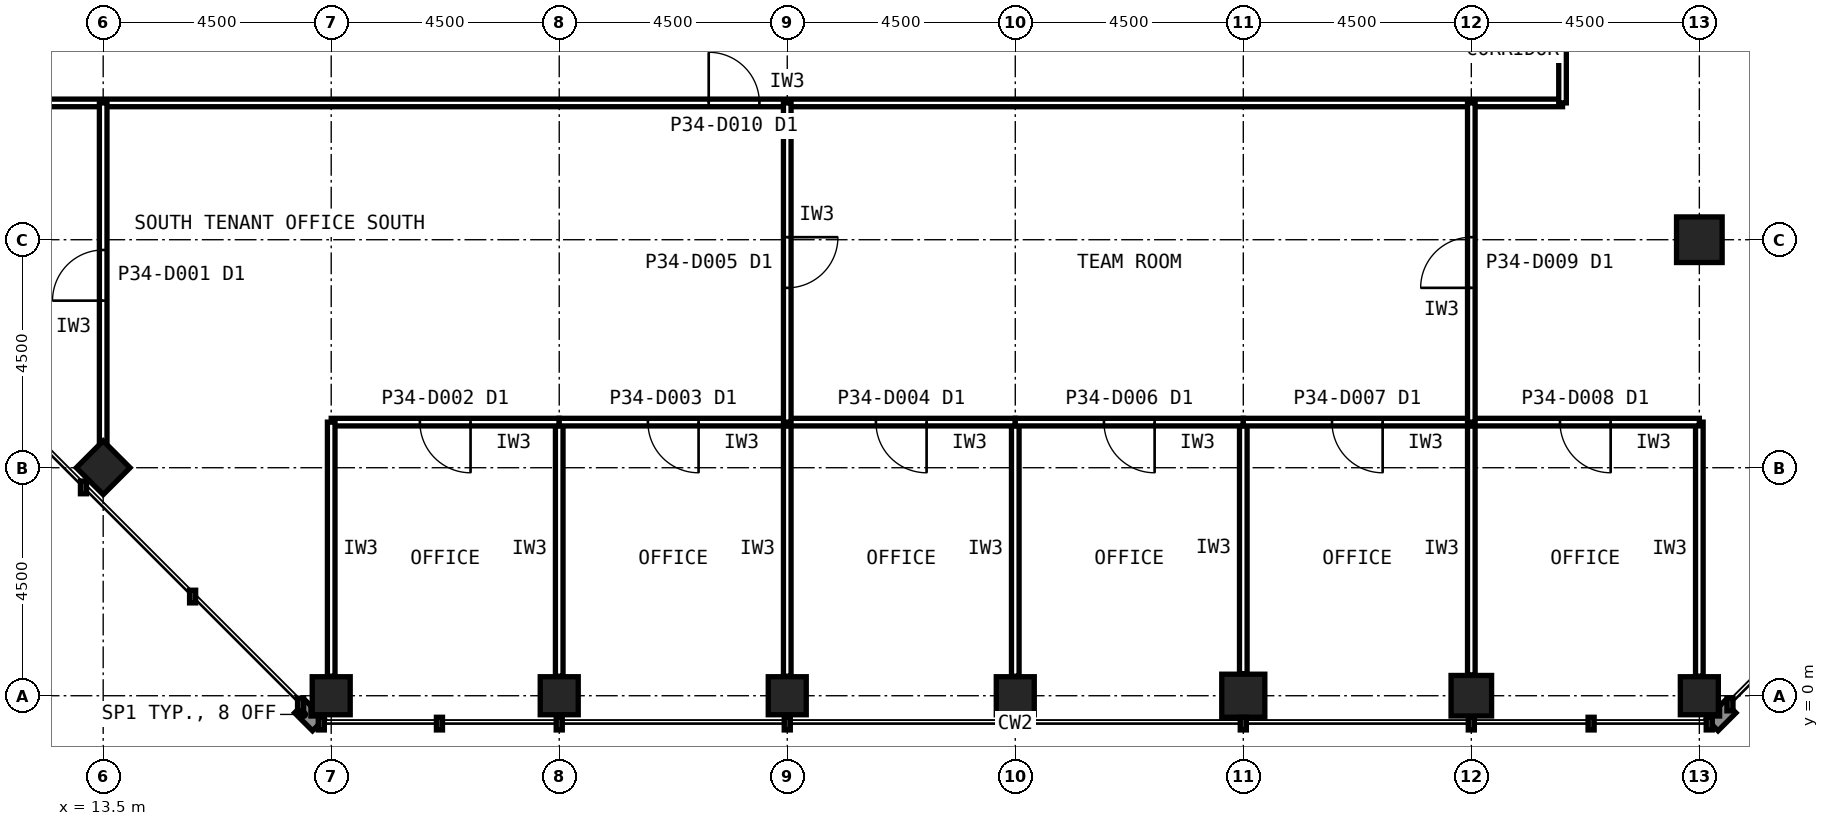
"""IFC4 building model, lengths in metres.
Left out: names, types, materials, properties, quantities, classifications, styles, units other than length and angle.
Written with IfcOpenShell. Run it as: python <this file> out.ifc"""

import sys

from ifc_helpers import new_model, si_unit, direction, frame, frame_2d, origin, origin_2d, place, context, subcontext, project, spatial, rectangle, hollow_rectangle, extrude, element, fill, save


model = new_model("IFC4")
c1 = context("Model", 3, precision=1e-05, world=origin(), true_north=direction((0.0, 1.0)))
c2 = subcontext(c1, "Body", "Model", "MODEL_VIEW")
j1 = project(units=[si_unit("LENGTHUNIT", "METRE"), si_unit("PLANEANGLEUNIT", "RADIAN")], contexts=[c1])
p1 = place(None, origin())
s1 = spatial("IfcSite", under=j1, at=p1, CompositionType="ELEMENT")
p2 = place(p1, origin())
s2 = spatial("IfcBuilding", under=s1, at=p2, CompositionType="ELEMENT")
p3 = place(p2, frame((0.0, 0.0, 143.6)))
s3 = spatial("IfcBuildingStorey", under=s2, at=p3, CompositionType="ELEMENT", Elevation=143.6)
for number, where, z_axis, x_axis in (
    (1, (18.0, 0.0, 0.0), (0.0, 0.0, 1.0), (1.0, 0.0, 0.0)),
    (2, (22.5, 0.0, 0.0), (0.0, 0.0, 1.0), (1.0, 0.0, 0.0)),
    (3, (27.0, 0.0, 0.0), (0.0, 0.0, 1.0), (1.0, 0.0, 0.0)),
    (4, (31.5, 0.0, 0.0), (0.0, 0.0, 1.0), (1.0, 0.0, 0.0)),
):
    element("IfcColumn", number, at=place(p3, frame(where, z_axis=z_axis, x_axis=x_axis)), inside=s3, PredefinedType="COLUMN", context=c2, shape_type="SweptSolid", body=[
        extrude(hollow_rectangle(XDim=0.75, YDim=0.75, WallThickness=0.04, at=origin_2d()), origin(), (0.0, 0.0, 1.0), 4.0),
    ])
p4 = place(p3, frame((36.0, 0.0, 0.0), z_axis=(0.0, 0.0, 1.0), x_axis=(1.0, 0.0, 0.0)))
e5 = element("IfcColumn", 5, at=p4, inside=s3, PredefinedType="COLUMN", context=c2, shape_type="SweptSolid", body=[
    extrude(hollow_rectangle(XDim=0.85, YDim=0.85, WallThickness=0.05, at=origin_2d()), origin(), (0.0, 0.0, 1.0), 4.0),
])
p5 = place(p3, frame((40.5, 0.0, 0.0), z_axis=(0.0, 0.0, 1.0), x_axis=(1.0, 0.0, 0.0)))
e6 = element("IfcColumn", 6, at=p5, inside=s3, PredefinedType="COLUMN", context=c2, shape_type="SweptSolid", body=[
    extrude(hollow_rectangle(XDim=0.8, YDim=0.8, WallThickness=0.045, at=origin_2d()), origin(), (0.0, 0.0, 1.0), 4.0),
])
for number, where, z_axis, x_axis in (
    (7, (45.0, 0.0, 0.0), (0.0, 0.0, 1.0), (1.0, 0.0, 0.0)),
    (8, (13.5, 4.5, 0.0), (0.0, 0.0, 1.0), (0.707, 0.707, 0.0)),
):
    element("IfcColumn", number, at=place(p3, frame(where, z_axis=z_axis, x_axis=x_axis)), inside=s3, PredefinedType="COLUMN", context=c2, shape_type="SweptSolid", body=[
        extrude(hollow_rectangle(XDim=0.75, YDim=0.75, WallThickness=0.04, at=origin_2d()), origin(), (0.0, 0.0, 1.0), 4.0),
    ])
p6 = place(p3, frame((45.0, 9.0, 0.0), z_axis=(0.0, 0.0, 1.0), x_axis=(1.0, 0.0, 0.0)))
e9 = element("IfcColumn", 9, at=p6, inside=s3, PredefinedType="COLUMN", context=c2, shape_type="SweptSolid", body=[
    extrude(hollow_rectangle(XDim=0.9, YDim=0.9, WallThickness=0.063, at=origin_2d()), origin(), (0.0, 0.0, 1.0), 4.0),
])
p7 = place(p3, frame((11.7, 11.7, 0.0), z_axis=(0.0, 0.0, 1.0), x_axis=(1.0, 0.0, 0.0)))
e10 = element("IfcWall", 10, at=p7, inside=s3, PredefinedType="PARTITIONING", context=c2, shape_type="SweptSolid", body=[
    extrude(rectangle(XDim=30.6, YDim=0.15, at=frame_2d((15.3, 0.0))), origin(), (0.0, 0.0, 1.0), 3.84),
])
p8 = place(p7, frame((13.75, 0.0, 0.0)))
e11 = element("IfcOpeningElement", 11, at=p8, cuts=e10, PredefinedType="OPENING", context=c2, shape_type="SweptSolid", body=[
    extrude(rectangle(XDim=1.0, YDim=2.1, at=frame_2d((0.5, 1.05))), frame((0.0, 0.085, 0.0), z_axis=(0.0, -1.0, 0.0), x_axis=(1.0, 0.0, 0.0)), (0.0, 0.0, 1.0), 0.17),
])
p9 = place(p3, frame((42.3, 11.7, 0.0), z_axis=(0.0, 0.0, 1.0), x_axis=(0.0, 1.0, 0.0)))
e12 = element("IfcWall", 12, at=p9, inside=s3, PredefinedType="PARTITIONING", context=c2, shape_type="SweptSolid", body=[
    extrude(rectangle(XDim=15.3, YDim=0.15, at=frame_2d((7.65, 0.0))), origin(), (0.0, 0.0, 1.0), 3.84),
])
p10 = place(p9, frame((7.15, 0.0, 0.0)))
e13 = element("IfcOpeningElement", 13, at=p10, cuts=e12, PredefinedType="OPENING", context=c2, shape_type="SweptSolid", body=[
    extrude(rectangle(XDim=1.0, YDim=2.1, at=frame_2d((0.5, 1.05))), frame((0.0, 0.085, 0.0), z_axis=(0.0, -1.0, 0.0), x_axis=(1.0, 0.0, 0.0)), (0.0, 0.0, 1.0), 0.17),
])
p11 = place(p3, frame((22.5, 0.385, 0.0), z_axis=(0.0, 0.0, 1.0), x_axis=(0.0, 1.0, 0.0)))
e14 = element("IfcWall", 14, at=p11, inside=s3, PredefinedType="PARTITIONING", context=c2, shape_type="SweptSolid", body=[
    extrude(rectangle(XDim=5.015, YDim=0.15, at=frame_2d((2.507, 0.0))), origin(), (0.0, 0.0, 1.0), 2.989),
])
p12 = place(p3, frame((22.5, 5.4, 0.0), z_axis=(0.0, 0.0, 1.0), x_axis=(-1.0, 0.0, 0.0)))
e15 = element("IfcWall", 15, at=p12, inside=s3, PredefinedType="PARTITIONING", context=c2, shape_type="SweptSolid", body=[
    extrude(rectangle(XDim=4.5, YDim=0.15, at=frame_2d((2.25, 0.0))), origin(), (0.0, 0.0, 1.0), 3.84),
])
p13 = place(p12, frame((1.75, 0.0, 0.0)))
e16 = element("IfcOpeningElement", 16, at=p13, cuts=e15, PredefinedType="OPENING", context=c2, shape_type="SweptSolid", body=[
    extrude(rectangle(XDim=1.0, YDim=2.1, at=frame_2d((0.5, 1.05))), frame((0.0, 0.085, 0.0), z_axis=(0.0, -1.0, 0.0), x_axis=(1.0, 0.0, 0.0)), (0.0, 0.0, 1.0), 0.17),
])
for number, where, z_axis, x_axis in (
    (17, (18.0, 5.4, 0.0), (0.0, 0.0, 1.0), (0.0, -1.0, 0.0)),
    (18, (27.0, 0.385, 0.0), (0.0, 0.0, 1.0), (0.0, 1.0, 0.0)),
):
    element("IfcWall", number, at=place(p3, frame(where, z_axis=z_axis, x_axis=x_axis)), inside=s3, PredefinedType="PARTITIONING", context=c2, shape_type="SweptSolid", body=[
        extrude(rectangle(XDim=5.015, YDim=0.15, at=frame_2d((2.507, 0.0))), origin(), (0.0, 0.0, 1.0), 2.989),
    ])
p14 = place(p3, frame((27.0, 5.4, 0.0), z_axis=(0.0, 0.0, 1.0), x_axis=(-1.0, 0.0, 0.0)))
e19 = element("IfcWall", 19, at=p14, inside=s3, PredefinedType="PARTITIONING", context=c2, shape_type="SweptSolid", body=[
    extrude(rectangle(XDim=4.5, YDim=0.15, at=frame_2d((2.25, 0.0))), origin(), (0.0, 0.0, 1.0), 3.84),
])
p15 = place(p14, frame((1.75, 0.0, 0.0)))
e20 = element("IfcOpeningElement", 20, at=p15, cuts=e19, PredefinedType="OPENING", context=c2, shape_type="SweptSolid", body=[
    extrude(rectangle(XDim=1.0, YDim=2.1, at=frame_2d((0.5, 1.05))), frame((0.0, 0.085, 0.0), z_axis=(0.0, -1.0, 0.0), x_axis=(1.0, 0.0, 0.0)), (0.0, 0.0, 1.0), 0.17),
])
p16 = place(p3, frame((31.5, 0.385, 0.0), z_axis=(0.0, 0.0, 1.0), x_axis=(0.0, 1.0, 0.0)))
e21 = element("IfcWall", 21, at=p16, inside=s3, PredefinedType="PARTITIONING", context=c2, shape_type="SweptSolid", body=[
    extrude(rectangle(XDim=5.015, YDim=0.15, at=frame_2d((2.507, 0.0))), origin(), (0.0, 0.0, 1.0), 2.989),
])
p17 = place(p3, frame((31.5, 5.4, 0.0), z_axis=(0.0, 0.0, 1.0), x_axis=(-1.0, 0.0, 0.0)))
e22 = element("IfcWall", 22, at=p17, inside=s3, PredefinedType="PARTITIONING", context=c2, shape_type="SweptSolid", body=[
    extrude(rectangle(XDim=4.5, YDim=0.15, at=frame_2d((2.25, 0.0))), origin(), (0.0, 0.0, 1.0), 3.84),
])
p18 = place(p17, frame((1.75, 0.0, 0.0)))
e23 = element("IfcOpeningElement", 23, at=p18, cuts=e22, PredefinedType="OPENING", context=c2, shape_type="SweptSolid", body=[
    extrude(rectangle(XDim=1.0, YDim=2.1, at=frame_2d((0.5, 1.05))), frame((0.0, 0.085, 0.0), z_axis=(0.0, -1.0, 0.0), x_axis=(1.0, 0.0, 0.0)), (0.0, 0.0, 1.0), 0.17),
])
p19 = place(p3, frame((36.0, 0.435, 0.0), z_axis=(0.0, 0.0, 1.0), x_axis=(0.0, 1.0, 0.0)))
e24 = element("IfcWall", 24, at=p19, inside=s3, PredefinedType="PARTITIONING", context=c2, shape_type="SweptSolid", body=[
    extrude(rectangle(XDim=4.965, YDim=0.15, at=frame_2d((2.482, 0.0))), origin(), (0.0, 0.0, 1.0), 2.989),
])
p20 = place(p3, frame((36.0, 5.4, 0.0), z_axis=(0.0, 0.0, 1.0), x_axis=(-1.0, 0.0, 0.0)))
e25 = element("IfcWall", 25, at=p20, inside=s3, PredefinedType="PARTITIONING", context=c2, shape_type="SweptSolid", body=[
    extrude(rectangle(XDim=4.5, YDim=0.15, at=frame_2d((2.25, 0.0))), origin(), (0.0, 0.0, 1.0), 3.84),
])
p21 = place(p20, frame((1.75, 0.0, 0.0)))
e26 = element("IfcOpeningElement", 26, at=p21, cuts=e25, PredefinedType="OPENING", context=c2, shape_type="SweptSolid", body=[
    extrude(rectangle(XDim=1.0, YDim=2.1, at=frame_2d((0.5, 1.05))), frame((0.0, 0.085, 0.0), z_axis=(0.0, -1.0, 0.0), x_axis=(1.0, 0.0, 0.0)), (0.0, 0.0, 1.0), 0.17),
])
p22 = place(p3, frame((40.5, 0.41, 0.0), z_axis=(0.0, 0.0, 1.0), x_axis=(0.0, 1.0, 0.0)))
e27 = element("IfcWall", 27, at=p22, inside=s3, PredefinedType="PARTITIONING", context=c2, shape_type="SweptSolid", body=[
    extrude(rectangle(XDim=4.99, YDim=0.15, at=frame_2d((2.495, 0.0))), origin(), (0.0, 0.0, 1.0), 2.989),
])
p23 = place(p3, frame((40.5, 5.4, 0.0), z_axis=(0.0, 0.0, 1.0), x_axis=(-1.0, 0.0, 0.0)))
e28 = element("IfcWall", 28, at=p23, inside=s3, PredefinedType="PARTITIONING", context=c2, shape_type="SweptSolid", body=[
    extrude(rectangle(XDim=4.5, YDim=0.15, at=frame_2d((2.25, 0.0))), origin(), (0.0, 0.0, 1.0), 3.84),
])
p24 = place(p23, frame((1.75, 0.0, 0.0)))
e29 = element("IfcOpeningElement", 29, at=p24, cuts=e28, PredefinedType="OPENING", context=c2, shape_type="SweptSolid", body=[
    extrude(rectangle(XDim=1.0, YDim=2.1, at=frame_2d((0.5, 1.05))), frame((0.0, 0.085, 0.0), z_axis=(0.0, -1.0, 0.0), x_axis=(1.0, 0.0, 0.0)), (0.0, 0.0, 1.0), 0.17),
])
p25 = place(p3, frame((45.0, 0.385, 0.0), z_axis=(0.0, 0.0, 1.0), x_axis=(0.0, 1.0, 0.0)))
e30 = element("IfcWall", 30, at=p25, inside=s3, PredefinedType="PARTITIONING", context=c2, shape_type="SweptSolid", body=[
    extrude(rectangle(XDim=5.015, YDim=0.15, at=frame_2d((2.507, 0.0))), origin(), (0.0, 0.0, 1.0), 3.229),
])
p26 = place(p3, frame((45.0, 5.4, 0.0), z_axis=(0.0, 0.0, 1.0), x_axis=(-1.0, 0.0, 0.0)))
e31 = element("IfcWall", 31, at=p26, inside=s3, PredefinedType="PARTITIONING", context=c2, shape_type="SweptSolid", body=[
    extrude(rectangle(XDim=4.5, YDim=0.15, at=frame_2d((2.25, 0.0))), origin(), (0.0, 0.0, 1.0), 3.84),
])
p27 = place(p26, frame((1.75, 0.0, 0.0)))
e32 = element("IfcOpeningElement", 32, at=p27, cuts=e31, PredefinedType="OPENING", context=c2, shape_type="SweptSolid", body=[
    extrude(rectangle(XDim=1.0, YDim=2.1, at=frame_2d((0.5, 1.05))), frame((0.0, 0.085, 0.0), z_axis=(0.0, -1.0, 0.0), x_axis=(1.0, 0.0, 0.0)), (0.0, 0.0, 1.0), 0.17),
])
p28 = place(p3, frame((40.5, 5.4, 0.0), z_axis=(0.0, 0.0, 1.0), x_axis=(0.0, 1.0, 0.0)))
e33 = element("IfcWall", 33, at=p28, inside=s3, PredefinedType="PARTITIONING", context=c2, shape_type="SweptSolid", body=[
    extrude(rectangle(XDim=6.3, YDim=0.15, at=frame_2d((3.15, 0.0))), origin(), (0.0, 0.0, 1.0), 2.989),
])
p29 = place(p28, frame((2.65, 0.0, 0.0)))
e34 = element("IfcOpeningElement", 34, at=p29, cuts=e33, PredefinedType="OPENING", context=c2, shape_type="SweptSolid", body=[
    extrude(rectangle(XDim=1.0, YDim=2.1, at=frame_2d((0.5, 1.05))), frame((0.0, 0.085, 0.0), z_axis=(0.0, -1.0, 0.0), x_axis=(1.0, 0.0, 0.0)), (0.0, 0.0, 1.0), 0.17),
])
p30 = place(p3, frame((13.5, 4.895, 0.0), z_axis=(0.0, 0.0, 1.0), x_axis=(0.0, 1.0, 0.0)))
e35 = element("IfcWall", 35, at=p30, inside=s3, PredefinedType="PARTITIONING", context=c2, shape_type="SweptSolid", body=[
    extrude(rectangle(XDim=6.805, YDim=0.15, at=frame_2d((3.402, 0.0))), origin(), (0.0, 0.0, 1.0), 2.989),
])
p31 = place(p30, frame((2.903, 0.0, 0.0)))
e36 = element("IfcOpeningElement", 36, at=p31, cuts=e35, PredefinedType="OPENING", context=c2, shape_type="SweptSolid", body=[
    extrude(rectangle(XDim=1.0, YDim=2.1, at=frame_2d((0.5, 1.05))), frame((0.0, 0.085, 0.0), z_axis=(0.0, -1.0, 0.0), x_axis=(1.0, 0.0, 0.0)), (0.0, 0.0, 1.0), 0.17),
])
p32 = place(p3, frame((27.0, 11.7, 0.0), z_axis=(0.0, 0.0, 1.0), x_axis=(0.0, -1.0, 0.0)))
e37 = element("IfcWall", 37, at=p32, inside=s3, PredefinedType="PARTITIONING", context=c2, shape_type="SweptSolid", body=[
    extrude(rectangle(XDim=6.3, YDim=0.15, at=frame_2d((3.15, 0.0))), origin(), (0.0, 0.0, 1.0), 2.989),
])
p33 = place(p32, frame((2.65, 0.0, 0.0)))
e38 = element("IfcOpeningElement", 38, at=p33, cuts=e37, PredefinedType="OPENING", context=c2, shape_type="SweptSolid", body=[
    extrude(rectangle(XDim=1.0, YDim=2.1, at=frame_2d((0.5, 1.05))), frame((0.0, 0.085, 0.0), z_axis=(0.0, -1.0, 0.0), x_axis=(1.0, 0.0, 0.0)), (0.0, 0.0, 1.0), 0.17),
])
p34 = place(p8, origin())
e39 = element("IfcDoor", 39, at=p34, inside=s3, OperationType="SINGLE_SWING_LEFT", PredefinedType="DOOR", context=c2, shape_type="SweptSolid", body=[
    extrude(rectangle(XDim=1.0, YDim=2.1, at=frame_2d((0.5, 1.05))), frame((0.0, 0.025, 0.0), z_axis=(0.0, -1.0, 0.0), x_axis=(1.0, 0.0, 0.0)), (0.0, 0.0, 1.0), 0.05),
])
fill(e11, e39)
p35 = place(p13, origin())
e40 = element("IfcDoor", 40, at=p35, inside=s3, OperationType="SINGLE_SWING_LEFT", PredefinedType="DOOR", context=c2, shape_type="SweptSolid", body=[
    extrude(rectangle(XDim=1.0, YDim=2.1, at=frame_2d((0.5, 1.05))), frame((0.0, 0.025, 0.0), z_axis=(0.0, -1.0, 0.0), x_axis=(1.0, 0.0, 0.0)), (0.0, 0.0, 1.0), 0.05),
])
fill(e16, e40)
p36 = place(p15, origin())
e41 = element("IfcDoor", 41, at=p36, inside=s3, OperationType="SINGLE_SWING_LEFT", PredefinedType="DOOR", context=c2, shape_type="SweptSolid", body=[
    extrude(rectangle(XDim=1.0, YDim=2.1, at=frame_2d((0.5, 1.05))), frame((0.0, 0.025, 0.0), z_axis=(0.0, -1.0, 0.0), x_axis=(1.0, 0.0, 0.0)), (0.0, 0.0, 1.0), 0.05),
])
fill(e20, e41)
p37 = place(p18, origin())
e42 = element("IfcDoor", 42, at=p37, inside=s3, OperationType="SINGLE_SWING_LEFT", PredefinedType="DOOR", context=c2, shape_type="SweptSolid", body=[
    extrude(rectangle(XDim=1.0, YDim=2.1, at=frame_2d((0.5, 1.05))), frame((0.0, 0.025, 0.0), z_axis=(0.0, -1.0, 0.0), x_axis=(1.0, 0.0, 0.0)), (0.0, 0.0, 1.0), 0.05),
])
fill(e23, e42)
p38 = place(p21, origin())
e43 = element("IfcDoor", 43, at=p38, inside=s3, OperationType="SINGLE_SWING_LEFT", PredefinedType="DOOR", context=c2, shape_type="SweptSolid", body=[
    extrude(rectangle(XDim=1.0, YDim=2.1, at=frame_2d((0.5, 1.05))), frame((0.0, 0.025, 0.0), z_axis=(0.0, -1.0, 0.0), x_axis=(1.0, 0.0, 0.0)), (0.0, 0.0, 1.0), 0.05),
])
fill(e26, e43)
p39 = place(p24, origin())
e44 = element("IfcDoor", 44, at=p39, inside=s3, OperationType="SINGLE_SWING_LEFT", PredefinedType="DOOR", context=c2, shape_type="SweptSolid", body=[
    extrude(rectangle(XDim=1.0, YDim=2.1, at=frame_2d((0.5, 1.05))), frame((0.0, 0.025, 0.0), z_axis=(0.0, -1.0, 0.0), x_axis=(1.0, 0.0, 0.0)), (0.0, 0.0, 1.0), 0.05),
])
fill(e29, e44)
p40 = place(p27, origin())
e45 = element("IfcDoor", 45, at=p40, inside=s3, OperationType="SINGLE_SWING_LEFT", PredefinedType="DOOR", context=c2, shape_type="SweptSolid", body=[
    extrude(rectangle(XDim=1.0, YDim=2.1, at=frame_2d((0.5, 1.05))), frame((0.0, 0.025, 0.0), z_axis=(0.0, -1.0, 0.0), x_axis=(1.0, 0.0, 0.0)), (0.0, 0.0, 1.0), 0.05),
])
fill(e32, e45)
p41 = place(p29, origin())
e46 = element("IfcDoor", 46, at=p41, inside=s3, OperationType="SINGLE_SWING_LEFT", PredefinedType="DOOR", context=c2, shape_type="SweptSolid", body=[
    extrude(rectangle(XDim=1.0, YDim=2.1, at=frame_2d((0.5, 1.05))), frame((0.0, 0.025, 0.0), z_axis=(0.0, -1.0, 0.0), x_axis=(1.0, 0.0, 0.0)), (0.0, 0.0, 1.0), 0.05),
])
fill(e34, e46)
p42 = place(p31, origin())
e47 = element("IfcDoor", 47, at=p42, inside=s3, OperationType="SINGLE_SWING_LEFT", PredefinedType="DOOR", context=c2, shape_type="SweptSolid", body=[
    extrude(rectangle(XDim=1.0, YDim=2.1, at=frame_2d((0.5, 1.05))), frame((0.0, 0.025, 0.0), z_axis=(0.0, -1.0, 0.0), x_axis=(1.0, 0.0, 0.0)), (0.0, 0.0, 1.0), 0.05),
])
fill(e36, e47)
p43 = place(p33, origin())
e48 = element("IfcDoor", 48, at=p43, inside=s3, OperationType="SINGLE_SWING_LEFT", PredefinedType="DOOR", context=c2, shape_type="SweptSolid", body=[
    extrude(rectangle(XDim=1.0, YDim=2.1, at=frame_2d((0.5, 1.05))), frame((0.0, 0.025, 0.0), z_axis=(0.0, -1.0, 0.0), x_axis=(1.0, 0.0, 0.0)), (0.0, 0.0, 1.0), 0.05),
])
fill(e38, e48)
save(model, sys.argv[1])
